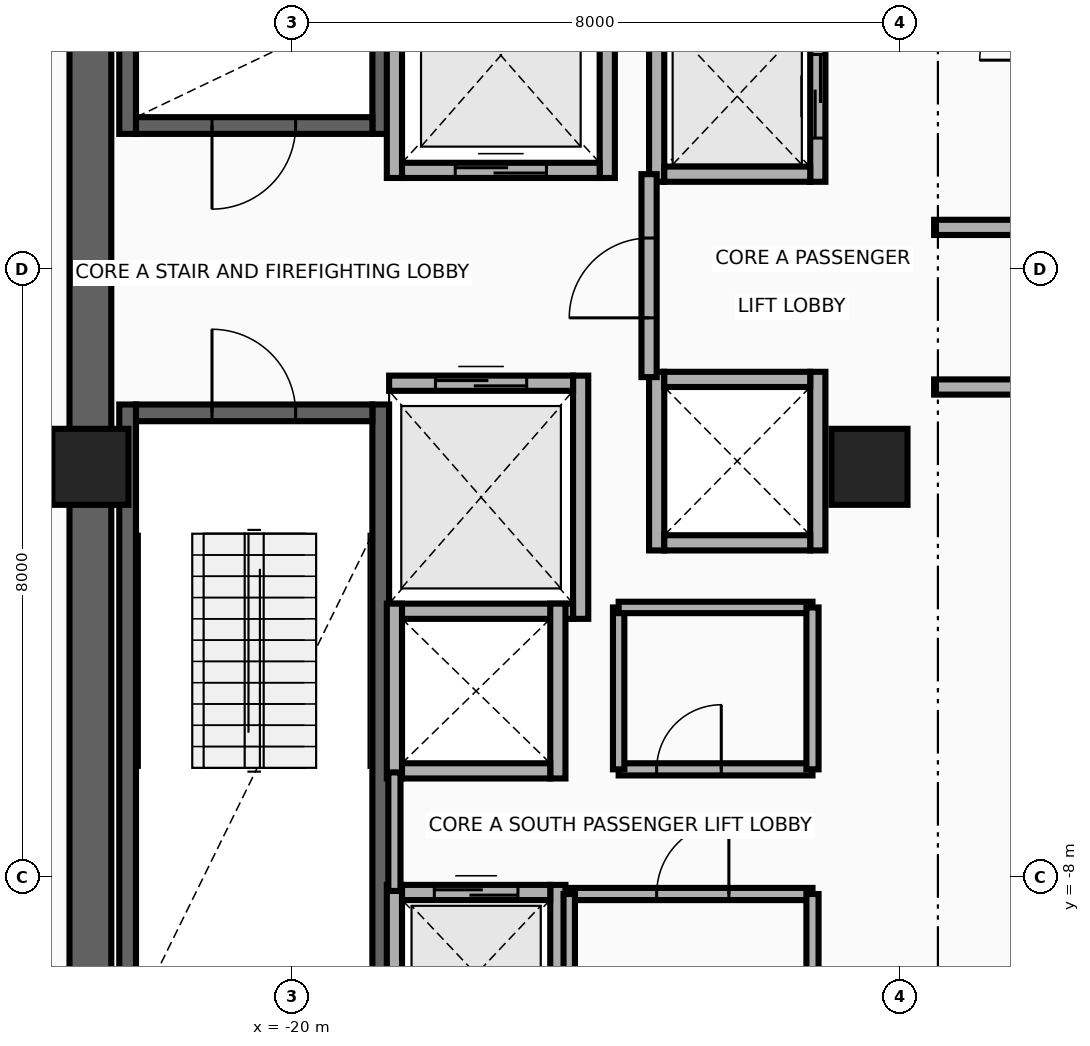
"""IFC4 building model, lengths in metres.
Left out: names, types, materials, properties, quantities, classifications, styles, units other than length and angle.
Written with IfcOpenShell. Run it as: python <this file> out.ifc"""

import sys

from ifc_helpers import new_model, si_unit, direction, frame, frame_2d, origin, origin_2d, place, context, subcontext, project, spatial, rectangle, extrude, source, transform, mapped, element, fill, save


model = new_model("IFC4")
c1 = context("Model", 3, precision=1e-05, world=origin(), true_north=direction((0.0, 1.0)))
c2 = subcontext(c1, "Body", "Model", "MODEL_VIEW")
j1 = project(units=[si_unit("LENGTHUNIT", "METRE"), si_unit("PLANEANGLEUNIT", "RADIAN")], contexts=[c1])
p1 = place(None, origin())
s1 = spatial("IfcSite", under=j1, at=p1, CompositionType="ELEMENT")
p2 = place(p1, origin())
s2 = spatial("IfcBuilding", under=s1, at=p2, CompositionType="ELEMENT")
p3 = place(p2, frame((0.0, 0.0, 172.3)))
s3 = spatial("IfcBuildingStorey", under=s2, at=p3, CompositionType="ELEMENT", Elevation=172.3)
for number, where, z_axis, x_axis in (
    (1, (-22.16, 1.78, 0.0), (0.0, 0.0, 1.0), (0.0, 1.0, 0.0)),
    (2, (-18.83, 1.78, 0.0), (0.0, 0.0, 1.0), (0.0, 1.0, 0.0)),
):
    element("IfcWall", number, at=place(p3, frame(where, z_axis=z_axis, x_axis=x_axis)), inside=s3, PredefinedType="SHEAR", context=c2, shape_type="SweptSolid", body=[
        extrude(rectangle(XDim=8.745, YDim=0.22, at=frame_2d((4.373, 0.0))), origin(), (0.0, 0.0, 1.0), 3.93),
    ])
p4 = place(p3, frame((-22.05, 1.89, 0.0), z_axis=(0.0, 0.0, 1.0), x_axis=(1.0, 0.0, 0.0)))
e3 = element("IfcWall", 3, at=p4, inside=s3, PredefinedType="SHEAR", context=c2, shape_type="SweptSolid", body=[
    extrude(rectangle(XDim=3.11, YDim=0.22, at=frame_2d((1.555, 0.0))), origin(), (0.0, 0.0, 1.0), 3.93),
])
p5 = place(p4, frame((1.0, 0.0, 0.0)))
e4 = element("IfcOpeningElement", 4, at=p5, cuts=e3, PredefinedType="OPENING", context=c2, shape_type="SweptSolid", body=[
    extrude(rectangle(XDim=1.1, YDim=2.15, at=frame_2d((0.55, 1.075))), frame((0.0, 0.125, 0.0), z_axis=(0.0, -1.0, 0.0), x_axis=(1.0, 0.0, 0.0)), (0.0, 0.0, 1.0), 0.25),
])
for number, where, z_axis, x_axis in (
    (5, (-22.16, -10.525, 0.0), (0.0, 0.0, 1.0), (0.0, 1.0, 0.0)),
    (6, (-18.83, -10.525, 0.0), (0.0, 0.0, 1.0), (0.0, 1.0, 0.0)),
):
    element("IfcWall", number, at=place(p3, frame(where, z_axis=z_axis, x_axis=x_axis)), inside=s3, PredefinedType="SHEAR", context=c2, shape_type="SweptSolid", body=[
        extrude(rectangle(XDim=8.745, YDim=0.22, at=frame_2d((4.373, 0.0))), origin(), (0.0, 0.0, 1.0), 3.93),
    ])
p6 = place(p3, frame((-22.05, -1.89, 0.0), z_axis=(0.0, 0.0, 1.0), x_axis=(1.0, 0.0, 0.0)))
e7 = element("IfcWall", 7, at=p6, inside=s3, PredefinedType="SHEAR", context=c2, shape_type="SweptSolid", body=[
    extrude(rectangle(XDim=3.11, YDim=0.22, at=frame_2d((1.555, 0.0))), origin(), (0.0, 0.0, 1.0), 3.93),
])
p7 = place(p6, frame((1.0, 0.0, 0.0)))
e8 = element("IfcOpeningElement", 8, at=p7, cuts=e7, PredefinedType="OPENING", context=c2, shape_type="SweptSolid", body=[
    extrude(rectangle(XDim=1.1, YDim=2.15, at=frame_2d((0.55, 1.075))), frame((0.0, 0.125, 0.0), z_axis=(0.0, -1.0, 0.0), x_axis=(1.0, 0.0, 0.0)), (0.0, 0.0, 1.0), 0.25),
])
p8 = place(p3, frame((-22.65, -11.075, 0.0), z_axis=(0.0, 0.0, 1.0), x_axis=(0.0, 1.0, 0.0)))
e9 = element("IfcWall", 9, at=p8, inside=s3, PredefinedType="SHEAR", context=c2, shape_type="SweptSolid", body=[
    extrude(rectangle(XDim=22.15, YDim=0.55, at=frame_2d((11.075, 0.0))), origin(), (0.0, 0.0, 1.0), 3.93),
])
m1 = source(origin(), c2, "Body", "SweptSolid", [
    extrude(rectangle(XDim=1.0, YDim=1.0, at=origin_2d()), origin(), (0.0, 0.0, 1.0), 4.25),
])
for number, where, z_axis, x_axis in (
    (10, (-22.65, -2.6, 0.0), (0.0, 0.0, 1.0), (1.0, 0.0, 0.0)),
    (11, (-12.4, -2.6, 0.0), (0.0, 0.0, 1.0), (1.0, 0.0, 0.0)),
):
    element("IfcColumn", number, at=place(p3, frame(where, z_axis=z_axis, x_axis=x_axis)), inside=s3, PredefinedType="COLUMN", context=c2, shape_type="MappedRepresentation", body=[
        mapped(m1, transform((0.0, 0.0, 0.0), x_axis=(1.0, 0.0, 0.0), y_axis=(0.0, 1.0, 0.0), z_axis=(0.0, 0.0, 1.0), scale=1.0)),
    ])
for number, where, z_axis, x_axis in (
    (12, (-18.65, 1.2, 0.0), (0.0, 0.0, 1.0), (0.0, 1.0, 0.0)),
    (13, (-15.85, 1.2, 0.0), (0.0, 0.0, 1.0), (0.0, 1.0, 0.0)),
):
    element("IfcWall", number, at=place(p3, frame(where, z_axis=z_axis, x_axis=x_axis)), inside=s3, PredefinedType="MOVABLE", context=c2, shape_type="SweptSolid", body=[
        extrude(rectangle(XDim=3.225, YDim=0.2, at=frame_2d((1.613, 0.0))), origin(), (0.0, 0.0, 1.0), 3.93),
    ])
p9 = place(p3, frame((-18.55, 1.3, 0.0), z_axis=(0.0, 0.0, 1.0), x_axis=(1.0, 0.0, 0.0)))
e14 = element("IfcWall", 14, at=p9, inside=s3, PredefinedType="MOVABLE", context=c2, shape_type="SweptSolid", body=[
    extrude(rectangle(XDim=2.6, YDim=0.2, at=frame_2d((1.3, 0.0))), origin(), (0.0, 0.0, 1.0), 3.93),
])
p10 = place(p9, frame((0.7, 0.0, 0.0)))
e15 = element("IfcOpeningElement", 15, at=p10, cuts=e14, PredefinedType="OPENING", context=c2, shape_type="SweptSolid", body=[
    extrude(rectangle(XDim=1.2, YDim=2.1, at=frame_2d((0.6, 1.05))), frame((0.0, 0.115, 0.0), z_axis=(0.0, -1.0, 0.0), x_axis=(1.0, 0.0, 0.0)), (0.0, 0.0, 1.0), 0.23),
])
p11 = place(p3, frame((-16.2, -4.6, 0.0), z_axis=(0.0, 0.0, 1.0), x_axis=(0.0, 1.0, 0.0)))
e16 = element("IfcWall", 16, at=p11, inside=s3, PredefinedType="MOVABLE", context=c2, shape_type="SweptSolid", body=[
    extrude(rectangle(XDim=3.2, YDim=0.2, at=frame_2d((1.6, 0.0))), origin(), (0.0, 0.0, 1.0), 3.93),
])
p12 = place(p3, frame((-18.72, -4.5, 0.0), z_axis=(0.0, 0.0, 1.0), x_axis=(1.0, 0.0, 0.0)))
e17 = element("IfcWall", 17, at=p12, inside=s3, PredefinedType="MOVABLE", context=c2, shape_type="SweptSolid", body=[
    extrude(rectangle(XDim=2.42, YDim=0.2, at=frame_2d((1.21, 0.0))), origin(), (0.0, 0.0, 1.0), 3.93),
])
p13 = place(p3, frame((-18.72, -1.5, 0.0), z_axis=(0.0, 0.0, 1.0), x_axis=(1.0, 0.0, 0.0)))
e18 = element("IfcWall", 18, at=p13, inside=s3, PredefinedType="MOVABLE", context=c2, shape_type="SweptSolid", body=[
    extrude(rectangle(XDim=2.42, YDim=0.2, at=frame_2d((1.21, 0.0))), origin(), (0.0, 0.0, 1.0), 3.93),
])
p14 = place(p13, frame((0.61, 0.0, 0.0)))
e19 = element("IfcOpeningElement", 19, at=p14, cuts=e18, PredefinedType="OPENING", context=c2, shape_type="SweptSolid", body=[
    extrude(rectangle(XDim=1.2, YDim=2.1, at=frame_2d((0.6, 1.05))), frame((0.0, 0.115, 0.0), z_axis=(0.0, -1.0, 0.0), x_axis=(1.0, 0.0, 0.0)), (0.0, 0.0, 1.0), 0.23),
])
for number, where, z_axis, x_axis in (
    (20, (-18.65, -10.45, 0.0), (0.0, 0.0, 1.0), (0.0, 1.0, 0.0)),
    (21, (-16.5, -10.45, 0.0), (0.0, 0.0, 1.0), (0.0, 1.0, 0.0)),
):
    element("IfcWall", number, at=place(p3, frame(where, z_axis=z_axis, x_axis=x_axis)), inside=s3, PredefinedType="MOVABLE", context=c2, shape_type="SweptSolid", body=[
        extrude(rectangle(XDim=2.35, YDim=0.2, at=frame_2d((1.175, 0.0))), origin(), (0.0, 0.0, 1.0), 2.965),
    ])
p15 = place(p3, frame((-18.55, -8.2, 0.0), z_axis=(0.0, 0.0, 1.0), x_axis=(1.0, 0.0, 0.0)))
e22 = element("IfcWall", 22, at=p15, inside=s3, PredefinedType="MOVABLE", context=c2, shape_type="SweptSolid", body=[
    extrude(rectangle(XDim=1.95, YDim=0.2, at=frame_2d((0.975, 0.0))), origin(), (0.0, 0.0, 1.0), 3.93),
])
p16 = place(p15, frame((0.425, 0.0, 0.0)))
e23 = element("IfcOpeningElement", 23, at=p16, cuts=e22, PredefinedType="OPENING", context=c2, shape_type="SweptSolid", body=[
    extrude(rectangle(XDim=1.1, YDim=2.1, at=frame_2d((0.55, 1.05))), frame((0.0, 0.115, 0.0), z_axis=(0.0, -1.0, 0.0), x_axis=(1.0, 0.0, 0.0)), (0.0, 0.0, 1.0), 0.23),
])
p17 = place(p3, frame((-15.2, 1.15, 0.0), z_axis=(0.0, 0.0, 1.0), x_axis=(0.0, 1.0, 0.0)))
e24 = element("IfcWall", 24, at=p17, inside=s3, PredefinedType="MOVABLE", context=c2, shape_type="SweptSolid", body=[
    extrude(rectangle(XDim=2.25, YDim=0.2, at=frame_2d((1.125, 0.0))), origin(), (0.0, 0.0, 1.0), 3.93),
])
p18 = place(p3, frame((-13.08, 1.15, 0.0), z_axis=(0.0, 0.0, 1.0), x_axis=(0.0, 1.0, 0.0)))
e25 = element("IfcWall", 25, at=p18, inside=s3, PredefinedType="MOVABLE", context=c2, shape_type="SweptSolid", body=[
    extrude(rectangle(XDim=2.25, YDim=0.2, at=frame_2d((1.125, 0.0))), origin(), (0.0, 0.0, 1.0), 3.93),
])
p19 = place(p18, frame((0.575, 0.0, 0.0)))
e26 = element("IfcOpeningElement", 26, at=p19, cuts=e25, PredefinedType="OPENING", context=c2, shape_type="SweptSolid", body=[
    extrude(rectangle(XDim=1.1, YDim=2.1, at=frame_2d((0.55, 1.05))), frame((0.0, 0.115, 0.0), z_axis=(0.0, -1.0, 0.0), x_axis=(1.0, 0.0, 0.0)), (0.0, 0.0, 1.0), 0.23),
])
p20 = place(p3, frame((-15.1, 1.25, 0.0), z_axis=(0.0, 0.0, 1.0), x_axis=(1.0, 0.0, 0.0)))
e27 = element("IfcWall", 27, at=p20, inside=s3, PredefinedType="MOVABLE", context=c2, shape_type="SweptSolid", body=[
    extrude(rectangle(XDim=1.92, YDim=0.2, at=frame_2d((0.96, 0.0))), origin(), (0.0, 0.0, 1.0), 3.93),
])
for number, where, z_axis, x_axis in (
    (28, (-18.65, -6.7, 0.0), (0.0, 0.0, 1.0), (0.0, 1.0, 0.0)),
    (29, (-16.5, -6.7, 0.0), (0.0, 0.0, 1.0), (0.0, 1.0, 0.0)),
):
    element("IfcWall", number, at=place(p3, frame(where, z_axis=z_axis, x_axis=x_axis)), inside=s3, PredefinedType="MOVABLE", context=c2, shape_type="SweptSolid", body=[
        extrude(rectangle(XDim=2.3, YDim=0.2, at=frame_2d((1.15, 0.0))), origin(), (0.0, 0.0, 1.0), 3.93),
    ])
p21 = place(p3, frame((-18.55, -6.6, 0.0), z_axis=(0.0, 0.0, 1.0), x_axis=(1.0, 0.0, 0.0)))
e30 = element("IfcWall", 30, at=p21, inside=s3, PredefinedType="MOVABLE", context=c2, shape_type="SweptSolid", body=[
    extrude(rectangle(XDim=1.95, YDim=0.2, at=frame_2d((0.975, 0.0))), origin(), (0.0, 0.0, 1.0), 3.93),
])
for number, where, z_axis, x_axis in (
    (31, (-15.2, -3.7, 0.0), (0.0, 0.0, 1.0), (0.0, 1.0, 0.0)),
    (32, (-13.08, -3.7, 0.0), (0.0, 0.0, 1.0), (0.0, 1.0, 0.0)),
):
    element("IfcWall", number, at=place(p3, frame(where, z_axis=z_axis, x_axis=x_axis)), inside=s3, PredefinedType="MOVABLE", context=c2, shape_type="SweptSolid", body=[
        extrude(rectangle(XDim=2.35, YDim=0.2, at=frame_2d((1.175, 0.0))), origin(), (0.0, 0.0, 1.0), 3.93),
    ])
for number, where, z_axis, x_axis in (
    (33, (-15.1, -3.6, 0.0), (0.0, 0.0, 1.0), (1.0, 0.0, 0.0)),
    (34, (-15.1, -1.45, 0.0), (0.0, 0.0, 1.0), (1.0, 0.0, 0.0)),
):
    element("IfcWall", number, at=place(p3, frame(where, z_axis=z_axis, x_axis=x_axis)), inside=s3, PredefinedType="MOVABLE", context=c2, shape_type="SweptSolid", body=[
        extrude(rectangle(XDim=1.92, YDim=0.2, at=frame_2d((0.96, 0.0))), origin(), (0.0, 0.0, 1.0), 3.93),
    ])
p22 = place(p3, frame((-15.3, -1.42, 0.0), z_axis=(0.0, 0.0, 1.0), x_axis=(0.0, 1.0, 0.0)))
e35 = element("IfcWall", 35, at=p22, inside=s3, PredefinedType="PARTITIONING", context=c2, shape_type="SweptSolid", body=[
    extrude(rectangle(XDim=2.67, YDim=0.2, at=frame_2d((1.335, 0.0))), origin(), (0.0, 0.0, 1.0), 3.93),
])
p23 = place(p22, frame((0.78, 0.0, 0.0)))
e36 = element("IfcOpeningElement", 36, at=p23, cuts=e35, PredefinedType="OPENING", context=c2, shape_type="SweptSolid", body=[
    extrude(rectangle(XDim=1.05, YDim=2.15, at=frame_2d((0.525, 1.075))), frame((0.0, 0.115, 0.0), z_axis=(0.0, -1.0, 0.0), x_axis=(1.0, 0.0, 0.0)), (0.0, 0.0, 1.0), 0.23),
])
p24 = place(p3, frame((-18.65, -8.18, 0.0), z_axis=(0.0, 0.0, 1.0), x_axis=(0.0, 1.0, 0.0)))
e37 = element("IfcWall", 37, at=p24, inside=s3, PredefinedType="PARTITIONING", context=c2, shape_type="SweptSolid", body=[
    extrude(rectangle(XDim=1.56, YDim=0.16, at=frame_2d((0.78, 0.0))), origin(), (0.0, 0.0, 1.0), 3.93),
])
p25 = place(p3, frame((-16.35, -8.22, 0.0), z_axis=(0.0, 0.0, 1.0), x_axis=(1.0, 0.0, 0.0)))
e38 = element("IfcWall", 38, at=p25, inside=s3, PredefinedType="PARTITIONING", context=c2, shape_type="SweptSolid", body=[
    extrude(rectangle(XDim=3.2, YDim=0.16, at=frame_2d((1.6, 0.0))), origin(), (0.0, 0.0, 1.0), 3.93),
])
p26 = place(p25, frame((1.15, 0.0, 0.0)))
e39 = element("IfcOpeningElement", 39, at=p26, cuts=e38, PredefinedType="OPENING", context=c2, shape_type="SweptSolid", body=[
    extrude(rectangle(XDim=0.95, YDim=2.15, at=frame_2d((0.475, 1.075))), frame((0.0, 0.095, 0.0), z_axis=(0.0, -1.0, 0.0), x_axis=(1.0, 0.0, 0.0)), (0.0, 0.0, 1.0), 0.19),
])
p27 = place(p3, frame((-16.35, -10.35, 0.0), z_axis=(0.0, 0.0, 1.0), x_axis=(0.0, 1.0, 0.0)))
e40 = element("IfcWall", 40, at=p27, inside=s3, PredefinedType="PARTITIONING", context=c2, shape_type="SweptSolid", body=[
    extrude(rectangle(XDim=2.13, YDim=0.15, at=frame_2d((1.065, 0.0))), origin(), (0.0, 0.0, 1.0), 3.93),
])
p28 = place(p3, frame((-13.15, -10.35, 0.0), z_axis=(0.0, 0.0, 1.0), x_axis=(0.0, 1.0, 0.0)))
e41 = element("IfcWall", 41, at=p28, inside=s3, PredefinedType="PARTITIONING", context=c2, shape_type="SweptSolid", body=[
    extrude(rectangle(XDim=2.13, YDim=0.16, at=frame_2d((1.065, 0.0))), origin(), (0.0, 0.0, 1.0), 3.93),
])
p29 = place(p3, frame((-15.7, -6.58, 0.0), z_axis=(0.0, 0.0, 1.0), x_axis=(1.0, 0.0, 0.0)))
e42 = element("IfcWall", 42, at=p29, inside=s3, PredefinedType="PARTITIONING", context=c2, shape_type="SweptSolid", body=[
    extrude(rectangle(XDim=2.55, YDim=0.16, at=frame_2d((1.275, 0.0))), origin(), (0.0, 0.0, 1.0), 3.93),
])
p30 = place(p29, frame((0.5, 0.0, 0.0)))
e43 = element("IfcOpeningElement", 43, at=p30, cuts=e42, PredefinedType="OPENING", context=c2, shape_type="SweptSolid", body=[
    extrude(rectangle(XDim=0.85, YDim=2.05, at=frame_2d((0.425, 1.025))), frame((0.0, 0.095, 0.0), z_axis=(0.0, -1.0, 0.0), x_axis=(1.0, 0.0, 0.0)), (0.0, 0.0, 1.0), 0.19),
])
p31 = place(p3, frame((-15.7, -6.58, 0.0), z_axis=(0.0, 0.0, 1.0), x_axis=(0.0, 1.0, 0.0)))
e44 = element("IfcWall", 44, at=p31, inside=s3, PredefinedType="PARTITIONING", context=c2, shape_type="SweptSolid", body=[
    extrude(rectangle(XDim=2.13, YDim=0.15, at=frame_2d((1.065, 0.0))), origin(), (0.0, 0.0, 1.0), 3.93),
])
p32 = place(p3, frame((-15.7, -4.45, 0.0), z_axis=(0.0, 0.0, 1.0), x_axis=(1.0, 0.0, 0.0)))
e45 = element("IfcWall", 45, at=p32, inside=s3, PredefinedType="PARTITIONING", context=c2, shape_type="SweptSolid", body=[
    extrude(rectangle(XDim=2.55, YDim=0.15, at=frame_2d((1.275, 0.0))), origin(), (0.0, 0.0, 1.0), 3.93),
])
p33 = place(p3, frame((-13.15, -6.58, 0.0), z_axis=(0.0, 0.0, 1.0), x_axis=(0.0, 1.0, 0.0)))
e46 = element("IfcWall", 46, at=p33, inside=s3, PredefinedType="PARTITIONING", context=c2, shape_type="SweptSolid", body=[
    extrude(rectangle(XDim=2.13, YDim=0.16, at=frame_2d((1.065, 0.0))), origin(), (0.0, 0.0, 1.0), 3.93),
])
p34 = place(p3, frame((-11.55, 0.55, 0.0), z_axis=(0.0, 0.0, 1.0), x_axis=(1.0, 0.0, 0.0)))
e47 = element("IfcWall", 47, at=p34, inside=s3, PredefinedType="PARTITIONING", context=c2, shape_type="SweptSolid", body=[
    extrude(rectangle(XDim=24.97, YDim=0.2, at=frame_2d((12.485, 0.0))), origin(), (0.0, 0.0, 1.0), 2.715),
])
p35 = place(p3, frame((-11.55, -1.55, 0.0), z_axis=(0.0, 0.0, 1.0), x_axis=(1.0, 0.0, 0.0)))
e48 = element("IfcWall", 48, at=p35, inside=s3, PredefinedType="PARTITIONING", context=c2, shape_type="SweptSolid", body=[
    extrude(rectangle(XDim=1.5, YDim=0.2, at=frame_2d((0.75, 0.0))), origin(), (0.0, 0.0, 1.0), 2.715),
])
p36 = place(p10, origin())
e49 = element("IfcDoor", 49, at=p36, inside=s3, OperationType="DOUBLE_DOOR_SLIDING", PredefinedType="DOOR", context=c2, shape_type="SweptSolid", body=[
    extrude(rectangle(XDim=1.2, YDim=2.1, at=frame_2d((0.6, 1.05))), frame((0.0, 0.025, 0.0), z_axis=(0.0, -1.0, 0.0), x_axis=(1.0, 0.0, 0.0)), (0.0, 0.0, 1.0), 0.05),
])
fill(e15, e49)
p37 = place(p14, origin())
e50 = element("IfcDoor", 50, at=p37, inside=s3, OperationType="DOUBLE_DOOR_SLIDING", PredefinedType="DOOR", context=c2, shape_type="SweptSolid", body=[
    extrude(rectangle(XDim=1.2, YDim=2.1, at=frame_2d((0.6, 1.05))), frame((0.0, 0.025, 0.0), z_axis=(0.0, -1.0, 0.0), x_axis=(1.0, 0.0, 0.0)), (0.0, 0.0, 1.0), 0.05),
])
fill(e19, e50)
p38 = place(p16, origin())
e51 = element("IfcDoor", 51, at=p38, inside=s3, OperationType="DOUBLE_DOOR_SLIDING", PredefinedType="DOOR", context=c2, shape_type="SweptSolid", body=[
    extrude(rectangle(XDim=1.1, YDim=2.1, at=frame_2d((0.55, 1.05))), frame((0.0, 0.025, 0.0), z_axis=(0.0, -1.0, 0.0), x_axis=(1.0, 0.0, 0.0)), (0.0, 0.0, 1.0), 0.05),
])
fill(e23, e51)
p39 = place(p19, origin())
e52 = element("IfcDoor", 52, at=p39, inside=s3, OperationType="DOUBLE_DOOR_SLIDING", PredefinedType="DOOR", context=c2, shape_type="SweptSolid", body=[
    extrude(rectangle(XDim=1.1, YDim=2.1, at=frame_2d((0.55, 1.05))), frame((0.0, 0.025, 0.0), z_axis=(0.0, -1.0, 0.0), x_axis=(1.0, 0.0, 0.0)), (0.0, 0.0, 1.0), 0.05),
])
fill(e26, e52)
p40 = place(p23, origin())
e53 = element("IfcDoor", 53, at=p40, inside=s3, OperationType="SINGLE_SWING_RIGHT", PredefinedType="DOOR", context=c2, shape_type="SweptSolid", body=[
    extrude(rectangle(XDim=1.05, YDim=2.15, at=frame_2d((0.525, 1.075))), frame((0.0, 0.025, 0.0), z_axis=(0.0, -1.0, 0.0), x_axis=(1.0, 0.0, 0.0)), (0.0, 0.0, 1.0), 0.05),
])
fill(e36, e53)
p41 = place(p5, frame((1.1, 0.0, 0.0), z_axis=(0.0, 0.0, 1.0), x_axis=(-1.0, 0.0, 0.0)))
e54 = element("IfcDoor", 54, at=p41, inside=s3, OperationType="SINGLE_SWING_LEFT", PredefinedType="DOOR", context=c2, shape_type="SweptSolid", body=[
    extrude(rectangle(XDim=1.1, YDim=2.15, at=frame_2d((0.55, 1.075))), frame((0.0, 0.025, 0.0), z_axis=(0.0, -1.0, 0.0), x_axis=(1.0, 0.0, 0.0)), (0.0, 0.0, 1.0), 0.05),
])
fill(e4, e54)
p42 = place(p7, origin())
e55 = element("IfcDoor", 55, at=p42, inside=s3, OperationType="SINGLE_SWING_RIGHT", PredefinedType="DOOR", context=c2, shape_type="SweptSolid", body=[
    extrude(rectangle(XDim=1.1, YDim=2.15, at=frame_2d((0.55, 1.075))), frame((0.0, 0.025, 0.0), z_axis=(0.0, -1.0, 0.0), x_axis=(1.0, 0.0, 0.0)), (0.0, 0.0, 1.0), 0.05),
])
fill(e8, e55)
p43 = place(p26, origin())
e56 = element("IfcDoor", 56, at=p43, inside=s3, OperationType="SINGLE_SWING_LEFT", PredefinedType="DOOR", context=c2, shape_type="SweptSolid", body=[
    extrude(rectangle(XDim=0.95, YDim=2.15, at=frame_2d((0.475, 1.075))), frame((0.0, 0.025, 0.0), z_axis=(0.0, -1.0, 0.0), x_axis=(1.0, 0.0, 0.0)), (0.0, 0.0, 1.0), 0.05),
])
fill(e39, e56)
p44 = place(p30, origin())
e57 = element("IfcDoor", 57, at=p44, inside=s3, OperationType="SINGLE_SWING_RIGHT", PredefinedType="DOOR", context=c2, shape_type="SweptSolid", body=[
    extrude(rectangle(XDim=0.85, YDim=2.05, at=frame_2d((0.425, 1.025))), frame((0.0, 0.025, 0.0), z_axis=(0.0, -1.0, 0.0), x_axis=(1.0, 0.0, 0.0)), (0.0, 0.0, 1.0), 0.05),
])
fill(e43, e57)
save(model, sys.argv[1])
